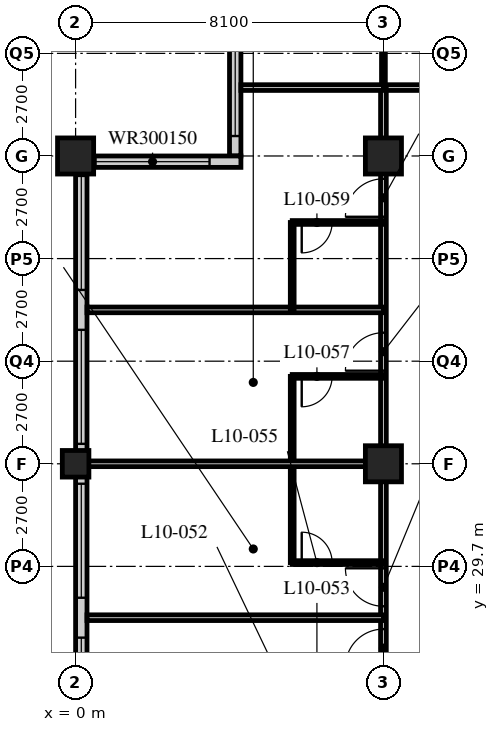
"""IFC4 building model, lengths in metres.
Left out: names, types, materials, properties, quantities, classifications, styles, units other than length and angle.
Written with IfcOpenShell. Run it as: python <this file> out.ifc"""

import sys

from ifc_helpers import new_model, si_unit, direction, frame, frame_2d, origin, origin_2d, place, context, subcontext, project, spatial, rectangle, hollow_rectangle, extrude, element, fill, save


model = new_model("IFC4")
c1 = context("Model", 3, precision=1e-05, world=origin(), true_north=direction((0.0, 1.0)))
c2 = subcontext(c1, "Body", "Model", "MODEL_VIEW")
j1 = project(units=[si_unit("LENGTHUNIT", "METRE"), si_unit("PLANEANGLEUNIT", "RADIAN")], contexts=[c1])
p1 = place(None, origin())
s1 = spatial("IfcSite", under=j1, at=p1, CompositionType="ELEMENT")
p2 = place(p1, origin())
s2 = spatial("IfcBuilding", under=s1, at=p2, CompositionType="ELEMENT")
p3 = place(p2, frame((0.0, 0.0, 46.6)))
s3 = spatial("IfcBuildingStorey", under=s2, at=p3, CompositionType="ELEMENT", Elevation=46.6)
p4 = place(p3, frame((0.0, 32.4, 0.0), z_axis=(0.0, 0.0, 1.0), x_axis=(1.0, 0.0, 0.0)))
e1 = element("IfcColumn", 1, at=p4, inside=s3, PredefinedType="COLUMN", context=c2, shape_type="SweptSolid", body=[
    extrude(hollow_rectangle(XDim=0.7, YDim=0.7, WallThickness=0.06, at=origin_2d()), origin(), (0.0, 0.0, 1.0), 3.4),
])
for number, where, z_axis, x_axis in (
    (2, (0.0, 40.5, 0.0), (0.0, 0.0, 1.0), (1.0, 0.0, 0.0)),
    (3, (8.1, 32.4, 0.0), (0.0, 0.0, 1.0), (1.0, 0.0, 0.0)),
    (4, (8.1, 40.5, 0.0), (0.0, 0.0, 1.0), (1.0, 0.0, 0.0)),
):
    element("IfcColumn", number, at=place(p3, frame(where, z_axis=z_axis, x_axis=x_axis)), inside=s3, PredefinedType="COLUMN", context=c2, shape_type="SweptSolid", body=[
        extrude(hollow_rectangle(XDim=0.95, YDim=0.95, WallThickness=0.095, at=origin_2d()), origin(), (0.0, 0.0, 1.0), 3.4),
    ])
p5 = place(p3, frame((4.2, 44.25, 0.0), z_axis=(0.0, 0.0, 1.0), x_axis=(0.0, -1.0, 0.0)))
e5 = element("IfcWall", 5, at=p5, inside=s3, PredefinedType="SOLIDWALL", context=c2, shape_type="SweptSolid", body=[
    extrude(rectangle(XDim=3.75, YDim=0.3, at=frame_2d((1.875, 0.0))), origin(), (0.0, 0.0, 1.0), 3.19),
])
p6 = place(p5, frame((0.225, 0.0, 0.9)))
e6 = element("IfcOpeningElement", 6, at=p6, cuts=e5, PredefinedType="OPENING", context=c2, shape_type="SweptSolid", body=[
    extrude(rectangle(XDim=3.0, YDim=1.5, at=frame_2d((1.5, 0.75))), frame((0.0, 0.16, 0.0), z_axis=(0.0, -1.0, 0.0), x_axis=(1.0, 0.0, 0.0)), (0.0, 0.0, 1.0), 0.32),
])
p7 = place(p3, frame((4.35, 40.35, 0.0), z_axis=(0.0, 0.0, 1.0), x_axis=(-1.0, 0.0, 0.0)))
e7 = element("IfcWall", 7, at=p7, inside=s3, PredefinedType="SOLIDWALL", context=c2, shape_type="SweptSolid", body=[
    extrude(rectangle(XDim=4.35, YDim=0.3, at=frame_2d((2.175, 0.0))), origin(), (0.0, 0.0, 1.0), 3.19),
])
p8 = place(p7, frame((0.825, 0.0, 0.9)))
e8 = element("IfcOpeningElement", 8, at=p8, cuts=e7, PredefinedType="OPENING", context=c2, shape_type="SweptSolid", body=[
    extrude(rectangle(XDim=3.0, YDim=1.5, at=frame_2d((1.5, 0.75))), frame((0.0, 0.16, 0.0), z_axis=(0.0, -1.0, 0.0), x_axis=(1.0, 0.0, 0.0)), (0.0, 0.0, 1.0), 0.32),
])
p9 = place(p3, frame((0.15, 40.2, 0.0), z_axis=(0.0, 0.0, 1.0), x_axis=(0.0, -1.0, 0.0)))
e9 = element("IfcWall", 9, at=p9, inside=s3, PredefinedType="SOLIDWALL", context=c2, shape_type="SweptSolid", body=[
    extrude(rectangle(XDim=32.1, YDim=0.3, at=frame_2d((16.05, 0.0))), origin(), (0.0, 0.0, 1.0), 3.19),
])
p10 = place(p9, frame((0.225, 0.0, 0.9)))
e10 = element("IfcOpeningElement", 10, at=p10, cuts=e9, PredefinedType="OPENING", context=c2, shape_type="SweptSolid", body=[
    extrude(rectangle(XDim=3.0, YDim=2.0, at=frame_2d((1.5, 1.0))), frame((0.0, 0.16, 0.0), z_axis=(0.0, -1.0, 0.0), x_axis=(1.0, 0.0, 0.0)), (0.0, 0.0, 1.0), 0.32),
])
p11 = place(p9, frame((4.275, 0.0, 0.9)))
e11 = element("IfcOpeningElement", 11, at=p11, cuts=e9, PredefinedType="OPENING", context=c2, shape_type="SweptSolid", body=[
    extrude(rectangle(XDim=3.0, YDim=2.0, at=frame_2d((1.5, 1.0))), frame((0.0, 0.16, 0.0), z_axis=(0.0, -1.0, 0.0), x_axis=(1.0, 0.0, 0.0)), (0.0, 0.0, 1.0), 0.32),
])
p12 = place(p9, frame((8.325, 0.0, 0.9)))
e12 = element("IfcOpeningElement", 12, at=p12, cuts=e9, PredefinedType="OPENING", context=c2, shape_type="SweptSolid", body=[
    extrude(rectangle(XDim=3.0, YDim=2.0, at=frame_2d((1.5, 1.0))), frame((0.0, 0.16, 0.0), z_axis=(0.0, -1.0, 0.0), x_axis=(1.0, 0.0, 0.0)), (0.0, 0.0, 1.0), 0.32),
])
p13 = place(p9, frame((12.375, 0.0, 0.9)))
e13 = element("IfcOpeningElement", 13, at=p13, cuts=e9, PredefinedType="OPENING", context=c2, shape_type="SweptSolid", body=[
    extrude(rectangle(XDim=3.0, YDim=2.0, at=frame_2d((1.5, 1.0))), frame((0.0, 0.16, 0.0), z_axis=(0.0, -1.0, 0.0), x_axis=(1.0, 0.0, 0.0)), (0.0, 0.0, 1.0), 0.32),
])
p14 = place(p9, frame((16.425, 0.0, 0.9)))
e14 = element("IfcOpeningElement", 14, at=p14, cuts=e9, PredefinedType="OPENING", context=c2, shape_type="SweptSolid", body=[
    extrude(rectangle(XDim=3.0, YDim=2.0, at=frame_2d((1.5, 1.0))), frame((0.0, 0.16, 0.0), z_axis=(0.0, -1.0, 0.0), x_axis=(1.0, 0.0, 0.0)), (0.0, 0.0, 1.0), 0.32),
])
p15 = place(p9, frame((20.475, 0.0, 0.9)))
e15 = element("IfcOpeningElement", 15, at=p15, cuts=e9, PredefinedType="OPENING", context=c2, shape_type="SweptSolid", body=[
    extrude(rectangle(XDim=3.0, YDim=2.0, at=frame_2d((1.5, 1.0))), frame((0.0, 0.16, 0.0), z_axis=(0.0, -1.0, 0.0), x_axis=(1.0, 0.0, 0.0)), (0.0, 0.0, 1.0), 0.32),
])
p16 = place(p9, frame((24.525, 0.0, 0.9)))
e16 = element("IfcOpeningElement", 16, at=p16, cuts=e9, PredefinedType="OPENING", context=c2, shape_type="SweptSolid", body=[
    extrude(rectangle(XDim=3.0, YDim=2.0, at=frame_2d((1.5, 1.0))), frame((0.0, 0.16, 0.0), z_axis=(0.0, -1.0, 0.0), x_axis=(1.0, 0.0, 0.0)), (0.0, 0.0, 1.0), 0.32),
])
p17 = place(p9, frame((28.575, 0.0, 0.9)))
e17 = element("IfcOpeningElement", 17, at=p17, cuts=e9, PredefinedType="OPENING", context=c2, shape_type="SweptSolid", body=[
    extrude(rectangle(XDim=3.0, YDim=2.0, at=frame_2d((1.5, 1.0))), frame((0.0, 0.16, 0.0), z_axis=(0.0, -1.0, 0.0), x_axis=(1.0, 0.0, 0.0)), (0.0, 0.0, 1.0), 0.32),
])
p18 = place(p3, frame((8.1, 42.3, 0.0), z_axis=(0.0, 0.0, 1.0), x_axis=(1.0, 0.0, 0.0)))
e18 = element("IfcWall", 18, at=p18, inside=s3, PredefinedType="PARTITIONING", context=c2, shape_type="SweptSolid", body=[
    extrude(rectangle(XDim=40.5, YDim=0.15, at=frame_2d((20.25, 0.0))), origin(), (0.0, 0.0, 1.0), 3.19),
])
p19 = place(p18, frame((6.5, 0.0, 0.0)))
e19 = element("IfcOpeningElement", 19, at=p19, cuts=e18, PredefinedType="OPENING", context=c2, shape_type="SweptSolid", body=[
    extrude(rectangle(XDim=1.0, YDim=2.1, at=frame_2d((0.5, 1.05))), frame((0.0, 0.085, 0.0), z_axis=(0.0, -1.0, 0.0), x_axis=(1.0, 0.0, 0.0)), (0.0, 0.0, 1.0), 0.17),
])
p20 = place(p18, frame((10.55, 0.0, 0.0)))
e20 = element("IfcOpeningElement", 20, at=p20, cuts=e18, PredefinedType="OPENING", context=c2, shape_type="SweptSolid", body=[
    extrude(rectangle(XDim=1.0, YDim=2.1, at=frame_2d((0.5, 1.05))), frame((0.0, 0.085, 0.0), z_axis=(0.0, -1.0, 0.0), x_axis=(1.0, 0.0, 0.0)), (0.0, 0.0, 1.0), 0.17),
])
p21 = place(p18, frame((14.6, 0.0, 0.0)))
e21 = element("IfcOpeningElement", 21, at=p21, cuts=e18, PredefinedType="OPENING", context=c2, shape_type="SweptSolid", body=[
    extrude(rectangle(XDim=1.0, YDim=2.1, at=frame_2d((0.5, 1.05))), frame((0.0, 0.085, 0.0), z_axis=(0.0, -1.0, 0.0), x_axis=(1.0, 0.0, 0.0)), (0.0, 0.0, 1.0), 0.17),
])
p22 = place(p18, frame((18.65, 0.0, 0.0)))
e22 = element("IfcOpeningElement", 22, at=p22, cuts=e18, PredefinedType="OPENING", context=c2, shape_type="SweptSolid", body=[
    extrude(rectangle(XDim=1.0, YDim=2.1, at=frame_2d((0.5, 1.05))), frame((0.0, 0.085, 0.0), z_axis=(0.0, -1.0, 0.0), x_axis=(1.0, 0.0, 0.0)), (0.0, 0.0, 1.0), 0.17),
])
p23 = place(p18, frame((22.7, 0.0, 0.0)))
e23 = element("IfcOpeningElement", 23, at=p23, cuts=e18, PredefinedType="OPENING", context=c2, shape_type="SweptSolid", body=[
    extrude(rectangle(XDim=1.0, YDim=2.1, at=frame_2d((0.5, 1.05))), frame((0.0, 0.085, 0.0), z_axis=(0.0, -1.0, 0.0), x_axis=(1.0, 0.0, 0.0)), (0.0, 0.0, 1.0), 0.17),
])
p24 = place(p18, frame((26.75, 0.0, 0.0)))
e24 = element("IfcOpeningElement", 24, at=p24, cuts=e18, PredefinedType="OPENING", context=c2, shape_type="SweptSolid", body=[
    extrude(rectangle(XDim=1.0, YDim=2.1, at=frame_2d((0.5, 1.05))), frame((0.0, 0.085, 0.0), z_axis=(0.0, -1.0, 0.0), x_axis=(1.0, 0.0, 0.0)), (0.0, 0.0, 1.0), 0.17),
])
p25 = place(p18, frame((30.8, 0.0, 0.0)))
e25 = element("IfcOpeningElement", 25, at=p25, cuts=e18, PredefinedType="OPENING", context=c2, shape_type="SweptSolid", body=[
    extrude(rectangle(XDim=1.0, YDim=2.1, at=frame_2d((0.5, 1.05))), frame((0.0, 0.085, 0.0), z_axis=(0.0, -1.0, 0.0), x_axis=(1.0, 0.0, 0.0)), (0.0, 0.0, 1.0), 0.17),
])
p26 = place(p18, frame((34.85, 0.0, 0.0)))
e26 = element("IfcOpeningElement", 26, at=p26, cuts=e18, PredefinedType="OPENING", context=c2, shape_type="SweptSolid", body=[
    extrude(rectangle(XDim=1.0, YDim=2.1, at=frame_2d((0.5, 1.05))), frame((0.0, 0.085, 0.0), z_axis=(0.0, -1.0, 0.0), x_axis=(1.0, 0.0, 0.0)), (0.0, 0.0, 1.0), 0.17),
])
p27 = place(p18, frame((36.875, 0.0, 0.0)))
e27 = element("IfcOpeningElement", 27, at=p27, cuts=e18, PredefinedType="OPENING", context=c2, shape_type="SweptSolid", body=[
    extrude(rectangle(XDim=1.0, YDim=2.1, at=frame_2d((0.5, 1.05))), frame((0.0, 0.085, 0.0), z_axis=(0.0, -1.0, 0.0), x_axis=(1.0, 0.0, 0.0)), (0.0, 0.0, 1.0), 0.17),
])
p28 = place(p18, frame((2.625, 0.0, 0.0)))
e28 = element("IfcOpeningElement", 28, at=p28, cuts=e18, PredefinedType="OPENING", context=c2, shape_type="SweptSolid", body=[
    extrude(rectangle(XDim=1.0, YDim=2.1, at=frame_2d((0.5, 1.05))), frame((0.0, 0.085, 0.0), z_axis=(0.0, -1.0, 0.0), x_axis=(1.0, 0.0, 0.0)), (0.0, 0.0, 1.0), 0.17),
])
p29 = place(p3, frame((8.1, 16.2, 0.0), z_axis=(0.0, 0.0, 1.0), x_axis=(0.0, 1.0, 0.0)))
e29 = element("IfcWall", 29, at=p29, inside=s3, PredefinedType="PARTITIONING", context=c2, shape_type="SweptSolid", body=[
    extrude(rectangle(XDim=26.1, YDim=0.15, at=frame_2d((13.05, 0.0))), origin(), (0.0, 0.0, 1.0), 2.578),
])
p30 = place(p29, frame((2.75, 0.0, 0.0)))
e30 = element("IfcOpeningElement", 30, at=p30, cuts=e29, PredefinedType="OPENING", context=c2, shape_type="SweptSolid", body=[
    extrude(rectangle(XDim=1.0, YDim=2.1, at=frame_2d((0.5, 1.05))), frame((0.0, 0.085, 0.0), z_axis=(0.0, -1.0, 0.0), x_axis=(1.0, 0.0, 0.0)), (0.0, 0.0, 1.0), 0.17),
])
p31 = place(p29, frame((4.35, 0.0, 0.0)))
e31 = element("IfcOpeningElement", 31, at=p31, cuts=e29, PredefinedType="OPENING", context=c2, shape_type="SweptSolid", body=[
    extrude(rectangle(XDim=1.0, YDim=2.1, at=frame_2d((0.5, 1.05))), frame((0.0, 0.085, 0.0), z_axis=(0.0, -1.0, 0.0), x_axis=(1.0, 0.0, 0.0)), (0.0, 0.0, 1.0), 0.17),
])
p32 = place(p29, frame((10.85, 0.0, 0.0)))
e32 = element("IfcOpeningElement", 32, at=p32, cuts=e29, PredefinedType="OPENING", context=c2, shape_type="SweptSolid", body=[
    extrude(rectangle(XDim=1.0, YDim=2.1, at=frame_2d((0.5, 1.05))), frame((0.0, 0.085, 0.0), z_axis=(0.0, -1.0, 0.0), x_axis=(1.0, 0.0, 0.0)), (0.0, 0.0, 1.0), 0.17),
])
p33 = place(p29, frame((12.45, 0.0, 0.0)))
e33 = element("IfcOpeningElement", 33, at=p33, cuts=e29, PredefinedType="OPENING", context=c2, shape_type="SweptSolid", body=[
    extrude(rectangle(XDim=1.0, YDim=2.1, at=frame_2d((0.5, 1.05))), frame((0.0, 0.085, 0.0), z_axis=(0.0, -1.0, 0.0), x_axis=(1.0, 0.0, 0.0)), (0.0, 0.0, 1.0), 0.17),
])
p34 = place(p29, frame((18.65, 0.0, 0.0)))
e34 = element("IfcOpeningElement", 34, at=p34, cuts=e29, PredefinedType="OPENING", context=c2, shape_type="SweptSolid", body=[
    extrude(rectangle(XDim=1.0, YDim=2.1, at=frame_2d((0.5, 1.05))), frame((0.0, 0.085, 0.0), z_axis=(0.0, -1.0, 0.0), x_axis=(1.0, 0.0, 0.0)), (0.0, 0.0, 1.0), 0.17),
])
p35 = place(p29, frame((22.7, 0.0, 0.0)))
e35 = element("IfcOpeningElement", 35, at=p35, cuts=e29, PredefinedType="OPENING", context=c2, shape_type="SweptSolid", body=[
    extrude(rectangle(XDim=1.0, YDim=2.1, at=frame_2d((0.5, 1.05))), frame((0.0, 0.085, 0.0), z_axis=(0.0, -1.0, 0.0), x_axis=(1.0, 0.0, 0.0)), (0.0, 0.0, 1.0), 0.17),
])
p36 = place(p3, frame((8.1, 28.35, 0.0), z_axis=(0.0, 0.0, 1.0), x_axis=(-1.0, 0.0, 0.0)))
e36 = element("IfcWall", 36, at=p36, inside=s3, PredefinedType="PARTITIONING", context=c2, shape_type="SweptSolid", body=[
    extrude(rectangle(XDim=7.8, YDim=0.15, at=frame_2d((3.9, 0.0))), origin(), (0.0, 0.0, 1.0), 3.19),
])
p37 = place(p3, frame((5.7, 29.8, 0.0), z_axis=(0.0, 0.0, 1.0), x_axis=(0.0, 1.0, 0.0)))
e37 = element("IfcWall", 37, at=p37, inside=s3, PredefinedType="PARTITIONING", context=c2, shape_type="SweptSolid", body=[
    extrude(rectangle(XDim=4.9, YDim=0.1, at=frame_2d((2.45, 0.0))), origin(), (0.0, 0.0, 1.0), 3.19),
])
p38 = place(p3, frame((8.1, 29.8, 0.0), z_axis=(0.0, 0.0, 1.0), x_axis=(-1.0, 0.0, 0.0)))
e38 = element("IfcWall", 38, at=p38, inside=s3, PredefinedType="PARTITIONING", context=c2, shape_type="SweptSolid", body=[
    extrude(rectangle(XDim=2.4, YDim=0.1, at=frame_2d((1.2, 0.0))), origin(), (0.0, 0.0, 1.0), 3.19),
])
p39 = place(p38, frame((1.35, 0.0, 0.0)))
e39 = element("IfcOpeningElement", 39, at=p39, cuts=e38, PredefinedType="OPENING", context=c2, shape_type="SweptSolid", body=[
    extrude(rectangle(XDim=0.8, YDim=2.1, at=frame_2d((0.4, 1.05))), frame((0.0, 0.06, 0.0), z_axis=(0.0, -1.0, 0.0), x_axis=(1.0, 0.0, 0.0)), (0.0, 0.0, 1.0), 0.12),
])
p40 = place(p3, frame((8.1, 32.4, 0.0), z_axis=(0.0, 0.0, 1.0), x_axis=(-1.0, 0.0, 0.0)))
e40 = element("IfcWall", 40, at=p40, inside=s3, PredefinedType="PARTITIONING", context=c2, shape_type="SweptSolid", body=[
    extrude(rectangle(XDim=7.8, YDim=0.15, at=frame_2d((3.9, 0.0))), origin(), (0.0, 0.0, 1.0), 2.578),
])
p41 = place(p3, frame((8.1, 34.7, 0.0), z_axis=(0.0, 0.0, 1.0), x_axis=(-1.0, 0.0, 0.0)))
e41 = element("IfcWall", 41, at=p41, inside=s3, PredefinedType="PARTITIONING", context=c2, shape_type="SweptSolid", body=[
    extrude(rectangle(XDim=2.4, YDim=0.1, at=frame_2d((1.2, 0.0))), origin(), (0.0, 0.0, 1.0), 3.19),
])
p42 = place(p41, frame((1.35, 0.0, 0.0)))
e42 = element("IfcOpeningElement", 42, at=p42, cuts=e41, PredefinedType="OPENING", context=c2, shape_type="SweptSolid", body=[
    extrude(rectangle(XDim=0.8, YDim=2.1, at=frame_2d((0.4, 1.05))), frame((0.0, 0.06, 0.0), z_axis=(0.0, -1.0, 0.0), x_axis=(1.0, 0.0, 0.0)), (0.0, 0.0, 1.0), 0.12),
])
p43 = place(p3, frame((8.1, 36.45, 0.0), z_axis=(0.0, 0.0, 1.0), x_axis=(-1.0, 0.0, 0.0)))
e43 = element("IfcWall", 43, at=p43, inside=s3, PredefinedType="PARTITIONING", context=c2, shape_type="SweptSolid", body=[
    extrude(rectangle(XDim=7.8, YDim=0.15, at=frame_2d((3.9, 0.0))), origin(), (0.0, 0.0, 1.0), 3.19),
])
p44 = place(p3, frame((5.7, 36.45, 0.0), z_axis=(0.0, 0.0, 1.0), x_axis=(0.0, 1.0, 0.0)))
e44 = element("IfcWall", 44, at=p44, inside=s3, PredefinedType="PARTITIONING", context=c2, shape_type="SweptSolid", body=[
    extrude(rectangle(XDim=2.3, YDim=0.1, at=frame_2d((1.15, 0.0))), origin(), (0.0, 0.0, 1.0), 3.19),
])
p45 = place(p3, frame((8.1, 38.75, 0.0), z_axis=(0.0, 0.0, 1.0), x_axis=(-1.0, 0.0, 0.0)))
e45 = element("IfcWall", 45, at=p45, inside=s3, PredefinedType="PARTITIONING", context=c2, shape_type="SweptSolid", body=[
    extrude(rectangle(XDim=2.4, YDim=0.1, at=frame_2d((1.2, 0.0))), origin(), (0.0, 0.0, 1.0), 3.19),
])
p46 = place(p45, frame((1.35, 0.0, 0.0)))
e46 = element("IfcOpeningElement", 46, at=p46, cuts=e45, PredefinedType="OPENING", context=c2, shape_type="SweptSolid", body=[
    extrude(rectangle(XDim=0.8, YDim=2.1, at=frame_2d((0.4, 1.05))), frame((0.0, 0.06, 0.0), z_axis=(0.0, -1.0, 0.0), x_axis=(1.0, 0.0, 0.0)), (0.0, 0.0, 1.0), 0.12),
])
p47 = place(p3, frame((8.1, 42.3, 0.0), z_axis=(0.0, 0.0, 1.0), x_axis=(0.0, 1.0, 0.0)))
e47 = element("IfcWall", 47, at=p47, inside=s3, PredefinedType="PARTITIONING", context=c2, shape_type="SweptSolid", body=[
    extrude(rectangle(XDim=2.25, YDim=0.1, at=frame_2d((1.125, 0.0))), origin(), (0.0, 0.0, 1.0), 2.578),
])
p48 = place(p3, frame((4.35, 42.3, 0.0), z_axis=(0.0, 0.0, 1.0), x_axis=(1.0, 0.0, 0.0)))
e48 = element("IfcWall", 48, at=p48, inside=s3, PredefinedType="PARTITIONING", context=c2, shape_type="SweptSolid", body=[
    extrude(rectangle(XDim=3.75, YDim=0.15, at=frame_2d((1.875, 0.0))), origin(), (0.0, 0.0, 1.0), 3.19),
])
p49 = place(p6, origin())
e49 = element("IfcWindow", 49, at=p49, inside=s3, PartitioningType="SINGLE_PANEL", PredefinedType="WINDOW", context=c2, shape_type="SweptSolid", body=[
    extrude(rectangle(XDim=3.0, YDim=1.5, at=frame_2d((1.5, 0.75))), frame((0.0, 0.03, 0.0), z_axis=(0.0, -1.0, 0.0), x_axis=(1.0, 0.0, 0.0)), (0.0, 0.0, 1.0), 0.06),
])
fill(e6, e49)
p50 = place(p8, origin())
e50 = element("IfcWindow", 50, at=p50, inside=s3, PartitioningType="SINGLE_PANEL", PredefinedType="WINDOW", context=c2, shape_type="SweptSolid", body=[
    extrude(rectangle(XDim=3.0, YDim=1.5, at=frame_2d((1.5, 0.75))), frame((0.0, 0.03, 0.0), z_axis=(0.0, -1.0, 0.0), x_axis=(1.0, 0.0, 0.0)), (0.0, 0.0, 1.0), 0.06),
])
fill(e8, e50)
p51 = place(p10, origin())
e51 = element("IfcWindow", 51, at=p51, inside=s3, PartitioningType="SINGLE_PANEL", PredefinedType="WINDOW", context=c2, shape_type="SweptSolid", body=[
    extrude(rectangle(XDim=3.0, YDim=2.0, at=frame_2d((1.5, 1.0))), frame((0.0, 0.03, 0.0), z_axis=(0.0, -1.0, 0.0), x_axis=(1.0, 0.0, 0.0)), (0.0, 0.0, 1.0), 0.06),
])
fill(e10, e51)
p52 = place(p11, origin())
e52 = element("IfcWindow", 52, at=p52, inside=s3, PartitioningType="SINGLE_PANEL", PredefinedType="WINDOW", context=c2, shape_type="SweptSolid", body=[
    extrude(rectangle(XDim=3.0, YDim=2.0, at=frame_2d((1.5, 1.0))), frame((0.0, 0.03, 0.0), z_axis=(0.0, -1.0, 0.0), x_axis=(1.0, 0.0, 0.0)), (0.0, 0.0, 1.0), 0.06),
])
fill(e11, e52)
p53 = place(p12, origin())
e53 = element("IfcWindow", 53, at=p53, inside=s3, PartitioningType="SINGLE_PANEL", PredefinedType="WINDOW", context=c2, shape_type="SweptSolid", body=[
    extrude(rectangle(XDim=3.0, YDim=2.0, at=frame_2d((1.5, 1.0))), frame((0.0, 0.03, 0.0), z_axis=(0.0, -1.0, 0.0), x_axis=(1.0, 0.0, 0.0)), (0.0, 0.0, 1.0), 0.06),
])
fill(e12, e53)
p54 = place(p13, origin())
e54 = element("IfcWindow", 54, at=p54, inside=s3, PartitioningType="SINGLE_PANEL", PredefinedType="WINDOW", context=c2, shape_type="SweptSolid", body=[
    extrude(rectangle(XDim=3.0, YDim=2.0, at=frame_2d((1.5, 1.0))), frame((0.0, 0.03, 0.0), z_axis=(0.0, -1.0, 0.0), x_axis=(1.0, 0.0, 0.0)), (0.0, 0.0, 1.0), 0.06),
])
fill(e13, e54)
p55 = place(p32, origin())
e55 = element("IfcDoor", 55, at=p55, inside=s3, OperationType="SINGLE_SWING_LEFT", PredefinedType="DOOR", context=c2, shape_type="SweptSolid", body=[
    extrude(rectangle(XDim=1.0, YDim=2.1, at=frame_2d((0.5, 1.05))), frame((0.0, 0.025, 0.0), z_axis=(0.0, -1.0, 0.0), x_axis=(1.0, 0.0, 0.0)), (0.0, 0.0, 1.0), 0.05),
])
fill(e32, e55)
p56 = place(p39, origin())
e56 = element("IfcDoor", 56, at=p56, inside=s3, OperationType="SINGLE_SWING_LEFT", PredefinedType="DOOR", context=c2, shape_type="SweptSolid", body=[
    extrude(rectangle(XDim=0.8, YDim=2.1, at=frame_2d((0.4, 1.05))), frame((0.0, 0.025, 0.0), z_axis=(0.0, -1.0, 0.0), x_axis=(1.0, 0.0, 0.0)), (0.0, 0.0, 1.0), 0.05),
])
fill(e39, e56)
p57 = place(p33, origin())
e57 = element("IfcDoor", 57, at=p57, inside=s3, OperationType="SINGLE_SWING_RIGHT", PredefinedType="DOOR", context=c2, shape_type="SweptSolid", body=[
    extrude(rectangle(XDim=1.0, YDim=2.1, at=frame_2d((0.5, 1.05))), frame((0.0, 0.025, 0.0), z_axis=(0.0, -1.0, 0.0), x_axis=(1.0, 0.0, 0.0)), (0.0, 0.0, 1.0), 0.05),
])
fill(e33, e57)
p58 = place(p42, origin())
e58 = element("IfcDoor", 58, at=p58, inside=s3, OperationType="SINGLE_SWING_RIGHT", PredefinedType="DOOR", context=c2, shape_type="SweptSolid", body=[
    extrude(rectangle(XDim=0.8, YDim=2.1, at=frame_2d((0.4, 1.05))), frame((0.0, 0.025, 0.0), z_axis=(0.0, -1.0, 0.0), x_axis=(1.0, 0.0, 0.0)), (0.0, 0.0, 1.0), 0.05),
])
fill(e42, e58)
p59 = place(p34, origin())
e59 = element("IfcDoor", 59, at=p59, inside=s3, OperationType="SINGLE_SWING_LEFT", PredefinedType="DOOR", context=c2, shape_type="SweptSolid", body=[
    extrude(rectangle(XDim=1.0, YDim=2.1, at=frame_2d((0.5, 1.05))), frame((0.0, 0.025, 0.0), z_axis=(0.0, -1.0, 0.0), x_axis=(1.0, 0.0, 0.0)), (0.0, 0.0, 1.0), 0.05),
])
fill(e34, e59)
p60 = place(p46, origin())
e60 = element("IfcDoor", 60, at=p60, inside=s3, OperationType="SINGLE_SWING_RIGHT", PredefinedType="DOOR", context=c2, shape_type="SweptSolid", body=[
    extrude(rectangle(XDim=0.8, YDim=2.1, at=frame_2d((0.4, 1.05))), frame((0.0, 0.025, 0.0), z_axis=(0.0, -1.0, 0.0), x_axis=(1.0, 0.0, 0.0)), (0.0, 0.0, 1.0), 0.05),
])
fill(e46, e60)
p61 = place(p35, origin())
e61 = element("IfcDoor", 61, at=p61, inside=s3, OperationType="SINGLE_SWING_LEFT", PredefinedType="DOOR", context=c2, shape_type="SweptSolid", body=[
    extrude(rectangle(XDim=1.0, YDim=2.1, at=frame_2d((0.5, 1.05))), frame((0.0, 0.025, 0.0), z_axis=(0.0, -1.0, 0.0), x_axis=(1.0, 0.0, 0.0)), (0.0, 0.0, 1.0), 0.05),
])
fill(e35, e61)
save(model, sys.argv[1])
